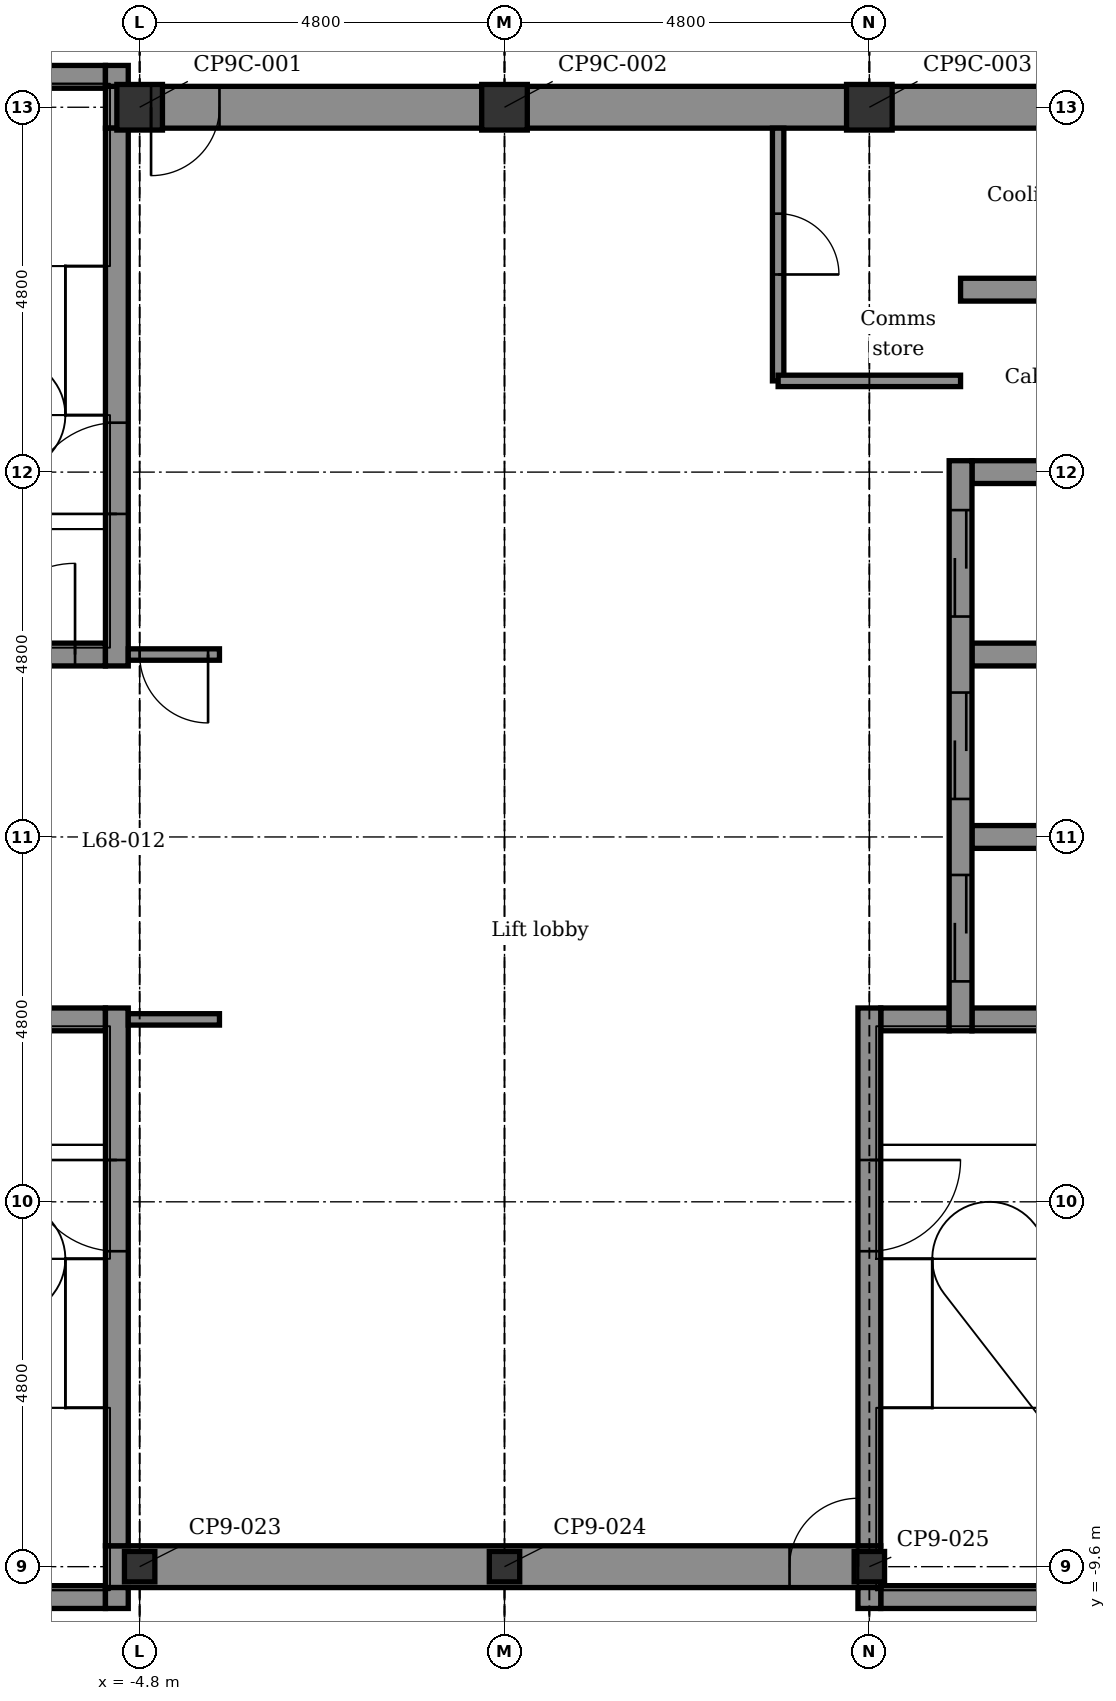
"""IFC4 building model, lengths in metres.
Left out: names, types, materials, properties, quantities, classifications, styles, units other than length and angle.
Written with IfcOpenShell. Run it as: python <this file> out.ifc"""

import sys

from ifc_helpers import new_model, si_unit, direction, frame, frame_2d, origin, origin_2d, place, context, subcontext, project, spatial, rectangle, hollow_rectangle, extrude, element, fill, save


model = new_model("IFC4")
c1 = context("Model", 3, precision=1e-05, world=origin(), true_north=direction((0.0, 1.0)))
c2 = subcontext(c1, "Body", "Model", "MODEL_VIEW")
j1 = project(units=[si_unit("LENGTHUNIT", "METRE"), si_unit("PLANEANGLEUNIT", "RADIAN")], contexts=[c1])
p1 = place(None, origin())
s1 = spatial("IfcSite", under=j1, at=p1, CompositionType="ELEMENT")
p2 = place(p1, origin())
s2 = spatial("IfcBuilding", under=s1, at=p2, CompositionType="ELEMENT")
p3 = place(p2, frame((0.0, 0.0, 301.9)))
s3 = spatial("IfcBuildingStorey", under=s2, at=p3, CompositionType="ELEMENT", Elevation=301.9)
p4 = place(p3, frame((-9.325, -10.0, -0.3), z_axis=(0.0, 0.0, 1.0), x_axis=(1.0, 0.0, 0.0)))
e1 = element("IfcWall", 1, at=p4, inside=s3, PredefinedType="STANDARD", context=c2, shape_type="SweptSolid", body=[
    extrude(rectangle(XDim=4.075, YDim=0.3, at=frame_2d((2.038, 0.0))), origin(), (0.0, 0.0, 1.0), 5.3),
])
p5 = place(p3, frame((4.95, -10.0, -0.3), z_axis=(0.0, 0.0, 1.0), x_axis=(1.0, 0.0, 0.0)))
e2 = element("IfcWall", 2, at=p5, inside=s3, PredefinedType="STANDARD", context=c2, shape_type="SweptSolid", body=[
    extrude(rectangle(XDim=4.375, YDim=0.3, at=frame_2d((2.188, 0.0))), origin(), (0.0, 0.0, 1.0), 5.3),
])
p6 = place(p3, frame((-5.25, -9.6, -0.3), z_axis=(0.0, 0.0, 1.0), x_axis=(1.0, 0.0, 0.0)))
e3 = element("IfcWall", 3, at=p6, inside=s3, PredefinedType="SHEAR", context=c2, shape_type="SweptSolid", body=[
    extrude(rectangle(XDim=10.2, YDim=0.55, at=frame_2d((5.1, 0.0))), origin(), (0.0, 0.0, 1.0), 5.3),
])
p7 = place(p6, frame((9.0, 0.0, 0.3)))
e4 = element("IfcOpeningElement", 4, at=p7, cuts=e3, PredefinedType="OPENING", context=c2, shape_type="SweptSolid", body=[
    extrude(rectangle(XDim=0.9, YDim=2.1, at=frame_2d((0.45, 1.05))), frame((0.0, 0.285, 0.0), z_axis=(0.0, -1.0, 0.0), x_axis=(1.0, 0.0, 0.0)), (0.0, 0.0, 1.0), 0.57),
])
p8 = place(p3, frame((-7.25, -2.4, -0.3), z_axis=(0.0, 0.0, 1.0), x_axis=(1.0, 0.0, 0.0)))
e5 = element("IfcWall", 5, at=p8, inside=s3, PredefinedType="STANDARD", context=c2, shape_type="SweptSolid", body=[
    extrude(rectangle(XDim=2.0, YDim=0.3, at=frame_2d((1.0, 0.0))), origin(), (0.0, 0.0, 1.0), 5.3),
])
p9 = place(p3, frame((4.95, -2.4, -0.3), z_axis=(0.0, 0.0, 1.0), x_axis=(1.0, 0.0, 0.0)))
e6 = element("IfcWall", 6, at=p9, inside=s3, PredefinedType="STANDARD", context=c2, shape_type="SweptSolid", body=[
    extrude(rectangle(XDim=0.9, YDim=0.3, at=frame_2d((0.45, 0.0))), origin(), (0.0, 0.0, 1.0), 5.3),
])
p10 = place(p3, frame((6.15, -2.4, -0.3), z_axis=(0.0, 0.0, 1.0), x_axis=(1.0, 0.0, 0.0)))
e7 = element("IfcWall", 7, at=p10, inside=s3, PredefinedType="STANDARD", context=c2, shape_type="SweptSolid", body=[
    extrude(rectangle(XDim=3.175, YDim=0.3, at=frame_2d((1.587, 0.0))), origin(), (0.0, 0.0, 1.0), 5.3),
])
p11 = place(p3, frame((6.15, 0.0, -0.3), z_axis=(0.0, 0.0, 1.0), x_axis=(1.0, 0.0, 0.0)))
e8 = element("IfcWall", 8, at=p11, inside=s3, PredefinedType="STANDARD", context=c2, shape_type="SweptSolid", body=[
    extrude(rectangle(XDim=3.175, YDim=0.3, at=frame_2d((1.587, 0.0))), origin(), (0.0, 0.0, 1.0), 4.7),
])
p12 = place(p3, frame((-7.25, 2.4, -0.3), z_axis=(0.0, 0.0, 1.0), x_axis=(1.0, 0.0, 0.0)))
e9 = element("IfcWall", 9, at=p12, inside=s3, PredefinedType="STANDARD", context=c2, shape_type="SweptSolid", body=[
    extrude(rectangle(XDim=2.0, YDim=0.3, at=frame_2d((1.0, 0.0))), origin(), (0.0, 0.0, 1.0), 5.3),
])
p13 = place(p12, frame((0.4, 0.0, 0.3)))
e10 = element("IfcOpeningElement", 10, at=p13, cuts=e9, PredefinedType="OPENING", context=c2, shape_type="SweptSolid", body=[
    extrude(rectangle(XDim=1.2, YDim=2.1, at=frame_2d((0.6, 1.05))), frame((0.0, 0.16, 0.0), z_axis=(0.0, -1.0, 0.0), x_axis=(1.0, 0.0, 0.0)), (0.0, 0.0, 1.0), 0.32),
])
p14 = place(p3, frame((6.15, 2.4, -0.3), z_axis=(0.0, 0.0, 1.0), x_axis=(1.0, 0.0, 0.0)))
e11 = element("IfcWall", 11, at=p14, inside=s3, PredefinedType="STANDARD", context=c2, shape_type="SweptSolid", body=[
    extrude(rectangle(XDim=3.175, YDim=0.3, at=frame_2d((1.587, 0.0))), origin(), (0.0, 0.0, 1.0), 4.7),
])
p15 = place(p3, frame((6.15, 4.8, -0.3), z_axis=(0.0, 0.0, 1.0), x_axis=(1.0, 0.0, 0.0)))
e12 = element("IfcWall", 12, at=p15, inside=s3, PredefinedType="STANDARD", context=c2, shape_type="SweptSolid", body=[
    extrude(rectangle(XDim=3.175, YDim=0.3, at=frame_2d((1.587, 0.0))), origin(), (0.0, 0.0, 1.0), 5.3),
])
p16 = place(p3, frame((6.0, 7.2, -0.3), z_axis=(0.0, 0.0, 1.0), x_axis=(1.0, 0.0, 0.0)))
e13 = element("IfcWall", 13, at=p16, inside=s3, PredefinedType="STANDARD", context=c2, shape_type="SweptSolid", body=[
    extrude(rectangle(XDim=3.325, YDim=0.3, at=frame_2d((1.663, 0.0))), origin(), (0.0, 0.0, 1.0), 5.3),
])
p17 = place(p3, frame((-5.25, 9.6, -0.3), z_axis=(0.0, 0.0, 1.0), x_axis=(1.0, 0.0, 0.0)))
e14 = element("IfcWall", 14, at=p17, inside=s3, PredefinedType="SHEAR", context=c2, shape_type="SweptSolid", body=[
    extrude(rectangle(XDim=14.575, YDim=0.55, at=frame_2d((7.288, 0.0))), origin(), (0.0, 0.0, 1.0), 5.3),
])
p18 = place(p17, frame((0.6, 0.0, 0.3)))
e15 = element("IfcOpeningElement", 15, at=p18, cuts=e14, PredefinedType="OPENING", context=c2, shape_type="SweptSolid", body=[
    extrude(rectangle(XDim=0.9, YDim=2.1, at=frame_2d((0.45, 1.05))), frame((0.0, 0.285, 0.0), z_axis=(0.0, -1.0, 0.0), x_axis=(1.0, 0.0, 0.0)), (0.0, 0.0, 1.0), 0.57),
])
p19 = place(p3, frame((-9.325, 10.0, -0.3), z_axis=(0.0, 0.0, 1.0), x_axis=(1.0, 0.0, 0.0)))
e16 = element("IfcWall", 16, at=p19, inside=s3, PredefinedType="STANDARD", context=c2, shape_type="SweptSolid", body=[
    extrude(rectangle(XDim=4.075, YDim=0.3, at=frame_2d((2.038, 0.0))), origin(), (0.0, 0.0, 1.0), 5.3),
])
p20 = place(p3, frame((-5.1, -10.15, -0.3), z_axis=(0.0, 0.0, 1.0), x_axis=(0.0, 1.0, 0.0)))
e17 = element("IfcWall", 17, at=p20, inside=s3, PredefinedType="STANDARD", context=c2, shape_type="SweptSolid", body=[
    extrude(rectangle(XDim=0.275, YDim=0.3, at=frame_2d((0.137, 0.0))), origin(), (0.0, 0.0, 1.0), 5.3),
])
p21 = place(p3, frame((-5.1, -9.325, -0.3), z_axis=(0.0, 0.0, 1.0), x_axis=(0.0, 1.0, 0.0)))
e18 = element("IfcWall", 18, at=p21, inside=s3, PredefinedType="STANDARD", context=c2, shape_type="SweptSolid", body=[
    extrude(rectangle(XDim=7.075, YDim=0.3, at=frame_2d((3.538, 0.0))), origin(), (0.0, 0.0, 1.0), 5.3),
])
p22 = place(p21, frame((3.875, 0.0, 0.3)))
e19 = element("IfcOpeningElement", 19, at=p22, cuts=e18, PredefinedType="OPENING", context=c2, shape_type="SweptSolid", body=[
    extrude(rectangle(XDim=1.2, YDim=2.1, at=frame_2d((0.6, 1.05))), frame((0.0, 0.16, 0.0), z_axis=(0.0, -1.0, 0.0), x_axis=(1.0, 0.0, 0.0)), (0.0, 0.0, 1.0), 0.32),
])
p23 = place(p3, frame((-5.1, 2.25, -0.3), z_axis=(0.0, 0.0, 1.0), x_axis=(0.0, 1.0, 0.0)))
e20 = element("IfcWall", 20, at=p23, inside=s3, PredefinedType="STANDARD", context=c2, shape_type="SweptSolid", body=[
    extrude(rectangle(XDim=7.075, YDim=0.3, at=frame_2d((3.538, 0.0))), origin(), (0.0, 0.0, 1.0), 5.3),
])
p24 = place(p23, frame((2.0, 0.0, 0.3)))
e21 = element("IfcOpeningElement", 21, at=p24, cuts=e20, PredefinedType="OPENING", context=c2, shape_type="SweptSolid", body=[
    extrude(rectangle(XDim=1.2, YDim=2.1, at=frame_2d((0.6, 1.05))), frame((0.0, 0.16, 0.0), z_axis=(0.0, -1.0, 0.0), x_axis=(1.0, 0.0, 0.0)), (0.0, 0.0, 1.0), 0.32),
])
for number, where, z_axis, x_axis in (
    (22, (-5.1, 9.875, -0.3), (0.0, 0.0, 1.0), (0.0, 1.0, 0.0)),
    (23, (4.8, -10.15, -0.3), (0.0, 0.0, 1.0), (0.0, 1.0, 0.0)),
):
    element("IfcWall", number, at=place(p3, frame(where, z_axis=z_axis, x_axis=x_axis)), inside=s3, PredefinedType="STANDARD", context=c2, shape_type="SweptSolid", body=[
        extrude(rectangle(XDim=0.275, YDim=0.3, at=frame_2d((0.137, 0.0))), origin(), (0.0, 0.0, 1.0), 5.3),
    ])
p25 = place(p3, frame((4.8, -9.325, -0.3), z_axis=(0.0, 0.0, 1.0), x_axis=(0.0, 1.0, 0.0)))
e24 = element("IfcWall", 24, at=p25, inside=s3, PredefinedType="STANDARD", context=c2, shape_type="SweptSolid", body=[
    extrude(rectangle(XDim=7.075, YDim=0.3, at=frame_2d((3.538, 0.0))), origin(), (0.0, 0.0, 1.0), 5.3),
])
p26 = place(p25, frame((3.875, 0.0, 0.3)))
e25 = element("IfcOpeningElement", 25, at=p26, cuts=e24, PredefinedType="OPENING", context=c2, shape_type="SweptSolid", body=[
    extrude(rectangle(XDim=1.2, YDim=2.1, at=frame_2d((0.6, 1.05))), frame((0.0, 0.16, 0.0), z_axis=(0.0, -1.0, 0.0), x_axis=(1.0, 0.0, 0.0)), (0.0, 0.0, 1.0), 0.32),
])
p27 = place(p3, frame((6.0, -2.55, -0.3), z_axis=(0.0, 0.0, 1.0), x_axis=(0.0, 1.0, 0.0)))
e26 = element("IfcWall", 26, at=p27, inside=s3, PredefinedType="STANDARD", context=c2, shape_type="SweptSolid", body=[
    extrude(rectangle(XDim=7.5, YDim=0.3, at=frame_2d((3.75, 0.0))), origin(), (0.0, 0.0, 1.0), 4.7),
])
p28 = place(p27, frame((0.65, 0.0, 0.3)))
e27 = element("IfcOpeningElement", 27, at=p28, cuts=e26, PredefinedType="OPENING", context=c2, shape_type="SweptSolid", body=[
    extrude(rectangle(XDim=1.4, YDim=2.1, at=frame_2d((0.7, 1.05))), frame((0.0, 0.16, 0.0), z_axis=(0.0, -1.0, 0.0), x_axis=(1.0, 0.0, 0.0)), (0.0, 0.0, 1.0), 0.32),
])
p29 = place(p27, frame((3.05, 0.0, 0.3)))
e28 = element("IfcOpeningElement", 28, at=p29, cuts=e26, PredefinedType="OPENING", context=c2, shape_type="SweptSolid", body=[
    extrude(rectangle(XDim=1.4, YDim=2.1, at=frame_2d((0.7, 1.05))), frame((0.0, 0.16, 0.0), z_axis=(0.0, -1.0, 0.0), x_axis=(1.0, 0.0, 0.0)), (0.0, 0.0, 1.0), 0.32),
])
p30 = place(p27, frame((5.45, 0.0, 0.3)))
e29 = element("IfcOpeningElement", 29, at=p30, cuts=e26, PredefinedType="OPENING", context=c2, shape_type="SweptSolid", body=[
    extrude(rectangle(XDim=1.4, YDim=2.1, at=frame_2d((0.7, 1.05))), frame((0.0, 0.16, 0.0), z_axis=(0.0, -1.0, 0.0), x_axis=(1.0, 0.0, 0.0)), (0.0, 0.0, 1.0), 0.32),
])
p31 = place(p3, frame((-4.8, -9.6, 5.0), z_axis=(0.0, 0.0, 1.0), x_axis=(1.0, 0.0, 0.0)))
e30 = element("IfcColumn", 30, at=p31, inside=s3, PredefinedType="COLUMN", context=c2, shape_type="SweptSolid", body=[
    extrude(hollow_rectangle(XDim=0.4, YDim=0.4, WallThickness=0.02, at=origin_2d()), origin(), (0.0, 0.0, 1.0), 2.917),
])
p32 = place(p3, frame((-4.8, 9.6, 5.0), z_axis=(0.0, 0.0, 1.0), x_axis=(1.0, 0.0, 0.0)))
e31 = element("IfcColumn", 31, at=p32, inside=s3, PredefinedType="COLUMN", context=c2, shape_type="SweptSolid", body=[
    extrude(hollow_rectangle(XDim=0.6, YDim=0.6, WallThickness=0.032, at=origin_2d()), origin(), (0.0, 0.0, 1.0), 14.915),
])
p33 = place(p3, frame((0.0, -9.6, 5.0), z_axis=(0.0, 0.0, 1.0), x_axis=(1.0, 0.0, 0.0)))
e32 = element("IfcColumn", 32, at=p33, inside=s3, PredefinedType="COLUMN", context=c2, shape_type="SweptSolid", body=[
    extrude(hollow_rectangle(XDim=0.4, YDim=0.4, WallThickness=0.02, at=origin_2d()), origin(), (0.0, 0.0, 1.0), 2.917),
])
p34 = place(p3, frame((0.0, 9.6, 5.0), z_axis=(0.0, 0.0, 1.0), x_axis=(1.0, 0.0, 0.0)))
e33 = element("IfcColumn", 33, at=p34, inside=s3, PredefinedType="COLUMN", context=c2, shape_type="SweptSolid", body=[
    extrude(hollow_rectangle(XDim=0.6, YDim=0.6, WallThickness=0.032, at=origin_2d()), origin(), (0.0, 0.0, 1.0), 14.915),
])
p35 = place(p3, frame((4.8, -9.6, 5.0), z_axis=(0.0, 0.0, 1.0), x_axis=(1.0, 0.0, 0.0)))
e34 = element("IfcColumn", 34, at=p35, inside=s3, PredefinedType="COLUMN", context=c2, shape_type="SweptSolid", body=[
    extrude(hollow_rectangle(XDim=0.4, YDim=0.4, WallThickness=0.02, at=origin_2d()), origin(), (0.0, 0.0, 1.0), 2.917),
])
p36 = place(p3, frame((4.8, 9.6, 5.0), z_axis=(0.0, 0.0, 1.0), x_axis=(1.0, 0.0, 0.0)))
e35 = element("IfcColumn", 35, at=p36, inside=s3, PredefinedType="COLUMN", context=c2, shape_type="SweptSolid", body=[
    extrude(hollow_rectangle(XDim=0.6, YDim=0.6, WallThickness=0.032, at=origin_2d()), origin(), (0.0, 0.0, 1.0), 14.915),
])
p37 = place(p3, frame((3.6, 6.0, 0.0), z_axis=(0.0, 0.0, 1.0), x_axis=(0.0, 1.0, 0.0)))
e36 = element("IfcWall", 36, at=p37, inside=s3, PredefinedType="PARTITIONING", context=c2, shape_type="SweptSolid", body=[
    extrude(rectangle(XDim=3.325, YDim=0.15, at=frame_2d((1.663, 0.0))), origin(), (0.0, 0.0, 1.0), 5.0),
])
p38 = place(p37, frame((1.4, 0.0, 0.0)))
e37 = element("IfcOpeningElement", 37, at=p38, cuts=e36, PredefinedType="OPENING", context=c2, shape_type="SweptSolid", body=[
    extrude(rectangle(XDim=0.8, YDim=2.1, at=frame_2d((0.4, 1.05))), frame((0.0, 0.085, 0.0), z_axis=(0.0, -1.0, 0.0), x_axis=(1.0, 0.0, 0.0)), (0.0, 0.0, 1.0), 0.17),
])
p39 = place(p3, frame((3.6, 6.0, 0.0), z_axis=(0.0, 0.0, 1.0), x_axis=(1.0, 0.0, 0.0)))
e38 = element("IfcWall", 38, at=p39, inside=s3, PredefinedType="PARTITIONING", context=c2, shape_type="SweptSolid", body=[
    extrude(rectangle(XDim=2.4, YDim=0.15, at=frame_2d((1.2, 0.0))), origin(), (0.0, 0.0, 1.0), 5.0),
])
p40 = place(p3, frame((-4.95, 2.4, 0.0), z_axis=(0.0, 0.0, 1.0), x_axis=(1.0, 0.0, 0.0)))
e39 = element("IfcWall", 39, at=p40, inside=s3, PredefinedType="PARTITIONING", context=c2, shape_type="SweptSolid", body=[
    extrude(rectangle(XDim=1.2, YDim=0.15, at=frame_2d((0.6, 0.0))), origin(), (0.0, 0.0, 1.0), 5.0),
])
p41 = place(p40, frame((0.15, 0.0, 0.0)))
e40 = element("IfcOpeningElement", 40, at=p41, cuts=e39, PredefinedType="OPENING", context=c2, shape_type="SweptSolid", body=[
    extrude(rectangle(XDim=0.9, YDim=2.1, at=frame_2d((0.45, 1.05))), frame((0.0, 0.085, 0.0), z_axis=(0.0, -1.0, 0.0), x_axis=(1.0, 0.0, 0.0)), (0.0, 0.0, 1.0), 0.17),
])
p42 = place(p3, frame((-4.95, -2.4, 0.0), z_axis=(0.0, 0.0, 1.0), x_axis=(1.0, 0.0, 0.0)))
e41 = element("IfcWall", 41, at=p42, inside=s3, PredefinedType="PARTITIONING", context=c2, shape_type="SweptSolid", body=[
    extrude(rectangle(XDim=1.2, YDim=0.15, at=frame_2d((0.6, 0.0))), origin(), (0.0, 0.0, 1.0), 5.0),
])
p43 = place(p38, frame((0.8, 0.0, 0.0), z_axis=(0.0, 0.0, 1.0), x_axis=(-1.0, 0.0, 0.0)))
e42 = element("IfcDoor", 42, at=p43, inside=s3, OperationType="SINGLE_SWING_LEFT", PredefinedType="DOOR", context=c2, shape_type="SweptSolid", body=[
    extrude(rectangle(XDim=0.8, YDim=2.1, at=frame_2d((0.4, 1.05))), frame((0.0, 0.025, 0.0), z_axis=(0.0, -1.0, 0.0), x_axis=(1.0, 0.0, 0.0)), (0.0, 0.0, 1.0), 0.05),
])
fill(e37, e42)
p44 = place(p28, origin())
e43 = element("IfcDoor", 43, at=p44, inside=s3, OperationType="DOUBLE_DOOR_SLIDING", PredefinedType="DOOR", context=c2, shape_type="SweptSolid", body=[
    extrude(rectangle(XDim=1.4, YDim=2.1, at=frame_2d((0.7, 1.05))), frame((0.0, 0.025, 0.0), z_axis=(0.0, -1.0, 0.0), x_axis=(1.0, 0.0, 0.0)), (0.0, 0.0, 1.0), 0.05),
])
fill(e27, e43)
p45 = place(p29, origin())
e44 = element("IfcDoor", 44, at=p45, inside=s3, OperationType="DOUBLE_DOOR_SLIDING", PredefinedType="DOOR", context=c2, shape_type="SweptSolid", body=[
    extrude(rectangle(XDim=1.4, YDim=2.1, at=frame_2d((0.7, 1.05))), frame((0.0, 0.025, 0.0), z_axis=(0.0, -1.0, 0.0), x_axis=(1.0, 0.0, 0.0)), (0.0, 0.0, 1.0), 0.05),
])
fill(e28, e44)
p46 = place(p30, origin())
e45 = element("IfcDoor", 45, at=p46, inside=s3, OperationType="DOUBLE_DOOR_SLIDING", PredefinedType="DOOR", context=c2, shape_type="SweptSolid", body=[
    extrude(rectangle(XDim=1.4, YDim=2.1, at=frame_2d((0.7, 1.05))), frame((0.0, 0.025, 0.0), z_axis=(0.0, -1.0, 0.0), x_axis=(1.0, 0.0, 0.0)), (0.0, 0.0, 1.0), 0.05),
])
fill(e29, e45)
p47 = place(p24, origin())
e46 = element("IfcDoor", 46, at=p47, inside=s3, OperationType="SINGLE_SWING_LEFT", PredefinedType="DOOR", context=c2, shape_type="SweptSolid", body=[
    extrude(rectangle(XDim=1.2, YDim=2.1, at=frame_2d((0.6, 1.05))), frame((0.0, 0.025, 0.0), z_axis=(0.0, -1.0, 0.0), x_axis=(1.0, 0.0, 0.0)), (0.0, 0.0, 1.0), 0.05),
])
fill(e21, e46)
p48 = place(p22, origin())
e47 = element("IfcDoor", 47, at=p48, inside=s3, OperationType="SINGLE_SWING_RIGHT", PredefinedType="DOOR", context=c2, shape_type="SweptSolid", body=[
    extrude(rectangle(XDim=1.2, YDim=2.1, at=frame_2d((0.6, 1.05))), frame((0.0, 0.025, 0.0), z_axis=(0.0, -1.0, 0.0), x_axis=(1.0, 0.0, 0.0)), (0.0, 0.0, 1.0), 0.05),
])
fill(e19, e47)
p49 = place(p26, frame((1.2, 0.0, 0.0), z_axis=(0.0, 0.0, 1.0), x_axis=(-1.0, 0.0, 0.0)))
e48 = element("IfcDoor", 48, at=p49, inside=s3, OperationType="SINGLE_SWING_RIGHT", PredefinedType="DOOR", context=c2, shape_type="SweptSolid", body=[
    extrude(rectangle(XDim=1.2, YDim=2.1, at=frame_2d((0.6, 1.05))), frame((0.0, 0.025, 0.0), z_axis=(0.0, -1.0, 0.0), x_axis=(1.0, 0.0, 0.0)), (0.0, 0.0, 1.0), 0.05),
])
fill(e25, e48)
p50 = place(p18, frame((0.9, 0.0, 0.0), z_axis=(0.0, 0.0, 1.0), x_axis=(-1.0, 0.0, 0.0)))
e49 = element("IfcDoor", 49, at=p50, inside=s3, OperationType="SINGLE_SWING_LEFT", PredefinedType="DOOR", context=c2, shape_type="SweptSolid", body=[
    extrude(rectangle(XDim=0.9, YDim=2.1, at=frame_2d((0.45, 1.05))), frame((0.0, 0.025, 0.0), z_axis=(0.0, -1.0, 0.0), x_axis=(1.0, 0.0, 0.0)), (0.0, 0.0, 1.0), 0.05),
])
fill(e15, e49)
p51 = place(p7, origin())
e50 = element("IfcDoor", 50, at=p51, inside=s3, OperationType="SINGLE_SWING_RIGHT", PredefinedType="DOOR", context=c2, shape_type="SweptSolid", body=[
    extrude(rectangle(XDim=0.9, YDim=2.1, at=frame_2d((0.45, 1.05))), frame((0.0, 0.025, 0.0), z_axis=(0.0, -1.0, 0.0), x_axis=(1.0, 0.0, 0.0)), (0.0, 0.0, 1.0), 0.05),
])
fill(e4, e50)
p52 = place(p41, frame((0.9, 0.0, 0.0), z_axis=(0.0, 0.0, 1.0), x_axis=(-1.0, 0.0, 0.0)))
e51 = element("IfcDoor", 51, at=p52, inside=s3, OperationType="SINGLE_SWING_RIGHT", PredefinedType="DOOR", context=c2, shape_type="SweptSolid", body=[
    extrude(rectangle(XDim=0.9, YDim=2.1, at=frame_2d((0.45, 1.05))), frame((0.0, 0.025, 0.0), z_axis=(0.0, -1.0, 0.0), x_axis=(1.0, 0.0, 0.0)), (0.0, 0.0, 1.0), 0.05),
])
fill(e40, e51)
p53 = place(p13, origin())
e52 = element("IfcDoor", 52, at=p53, inside=s3, OperationType="SINGLE_SWING_RIGHT", PredefinedType="DOOR", context=c2, shape_type="SweptSolid", body=[
    extrude(rectangle(XDim=1.2, YDim=2.1, at=frame_2d((0.6, 1.05))), frame((0.0, 0.025, 0.0), z_axis=(0.0, -1.0, 0.0), x_axis=(1.0, 0.0, 0.0)), (0.0, 0.0, 1.0), 0.05),
])
fill(e10, e52)
save(model, sys.argv[1])
